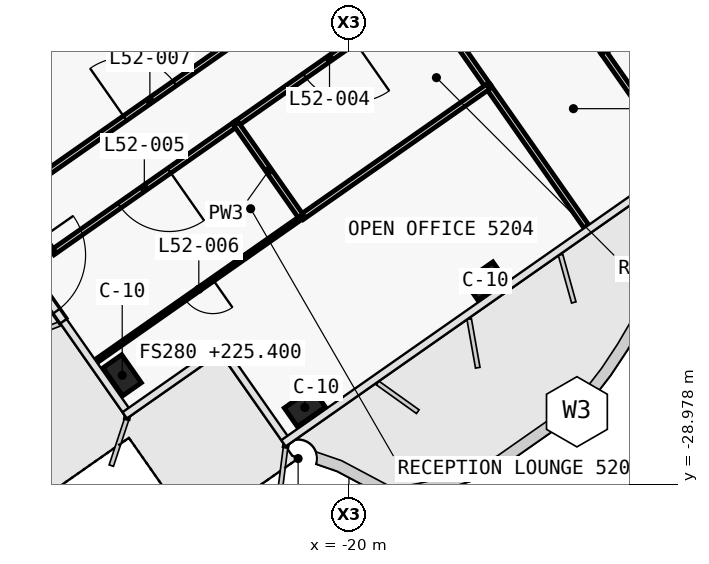
"""IFC4 building model, lengths in metres.
Left out: names, types, materials, properties, quantities, classifications, styles, units other than length and angle.
Written with IfcOpenShell. Run it as: python <this file> out.ifc"""

import sys

from ifc_helpers import new_model, si_unit, direction, frame, frame_2d, origin, origin_2d, place, context, subcontext, project, spatial, rectangle, extrude, element, fill, save


model = new_model("IFC4")
c1 = context("Model", 3, precision=1e-05, world=origin(), true_north=direction((0.0, 1.0)))
c2 = subcontext(c1, "Body", "Model", "MODEL_VIEW")
j1 = project(units=[si_unit("LENGTHUNIT", "METRE"), si_unit("PLANEANGLEUNIT", "RADIAN")], contexts=[c1])
p1 = place(None, origin())
s1 = spatial("IfcSite", under=j1, at=p1, CompositionType="ELEMENT")
p2 = place(p1, origin())
s2 = spatial("IfcBuilding", under=s1, at=p2, CompositionType="ELEMENT")
p3 = place(p2, frame((0.0, 0.0, 225.4)))
s3 = spatial("IfcBuildingStorey", under=s2, at=p3, CompositionType="ELEMENT", Elevation=225.4)
for number, where, z_axis, x_axis in (
    (1, (-16.41, -23.637, 0.0), (0.0, 0.0, 1.0), (-0.819, -0.574, 0.0)),
    (2, (-21.161, -26.964, 0.0), (0.0, 0.0, 1.0), (-0.819, -0.574, 0.0)),
    (3, (-25.966, -26.117, 0.0), (0.0, 0.0, 1.0), (-0.574, 0.819, 0.0)),
):
    element("IfcColumn", number, at=place(p3, frame(where, z_axis=z_axis, x_axis=x_axis)), inside=s3, PredefinedType="COLUMN", context=c2, shape_type="SweptSolid", body=[
        extrude(rectangle(XDim=0.9, YDim=0.6, at=origin_2d()), origin(), (0.0, 0.0, 1.0), 3.9),
    ])
p4 = place(p3, frame((-29.243, -22.222, 0.0), z_axis=(0.0, 0.0, 1.0), x_axis=(0.57360481557, -0.819132172213, 0.0)))
e4 = element("IfcWall", 4, at=p4, inside=s3, PredefinedType="SOLIDWALL", context=c2, shape_type="SweptSolid", body=[
    extrude(rectangle(XDim=2.99, YDim=0.2, at=frame_2d((1.495, 0.0))), origin(), (0.0, 0.0, 1.0), 3.62),
])
p5 = place(p4, frame((0.895, 0.0, 0.0)))
e5 = element("IfcOpeningElement", 5, at=p5, cuts=e4, PredefinedType="OPENING", context=c2, shape_type="SweptSolid", body=[
    extrude(rectangle(XDim=1.8, YDim=2.4, at=frame_2d((0.9, 1.2))), frame((0.0, 0.11, 0.0), z_axis=(0.0, -1.0, 0.0), x_axis=(1.0, 0.0, 0.0)), (0.0, 0.0, 1.0), 0.22),
])
p6 = place(p3, frame((-28.834, -21.411, 0.0), z_axis=(0.0, 0.0, 1.0), x_axis=(0.819144386599, 0.57358737251, 0.0)))
e6 = element("IfcWall", 6, at=p6, inside=s3, PredefinedType="PARTITIONING", context=c2, shape_type="SweptSolid", body=[
    extrude(rectangle(XDim=8.78, YDim=0.15, at=frame_2d((4.39, 0.0))), origin(), (0.0, 0.0, 1.0), 3.05),
])
p7 = place(p6, frame((3.59, 0.0, 0.0)))
e7 = element("IfcOpeningElement", 7, at=p7, cuts=e6, PredefinedType="OPENING", context=c2, shape_type="SweptSolid", body=[
    extrude(rectangle(XDim=1.6, YDim=2.1, at=frame_2d((0.8, 1.05))), frame((0.0, 0.085, 0.0), z_axis=(0.0, -1.0, 0.0), x_axis=(1.0, 0.0, 0.0)), (0.0, 0.0, 1.0), 0.17),
])
p8 = place(p3, frame((-18.052, -16.058, 0.0), z_axis=(0.0, 0.0, 1.0), x_axis=(-0.819145946981, -0.573585144111, 0.0)))
e8 = element("IfcWall", 8, at=p8, inside=s3, PredefinedType="PARTITIONING", context=c2, shape_type="SweptSolid", body=[
    extrude(rectangle(XDim=6.004, YDim=0.15, at=frame_2d((3.002, 0.0))), origin(), (0.0, 0.0, 1.0), 3.05),
])
p9 = place(p8, frame((2.202, 0.0, 0.0)))
e9 = element("IfcOpeningElement", 9, at=p9, cuts=e8, PredefinedType="OPENING", context=c2, shape_type="SweptSolid", body=[
    extrude(rectangle(XDim=1.6, YDim=2.1, at=frame_2d((0.8, 1.05))), frame((0.0, 0.085, 0.0), z_axis=(0.0, -1.0, 0.0), x_axis=(1.0, 0.0, 0.0)), (0.0, 0.0, 1.0), 0.17),
])
p10 = place(p3, frame((-22.967, -19.5, 0.0), z_axis=(0.0, 0.0, 1.0), x_axis=(-0.819156123335, -0.573570610825, 0.0)))
e10 = element("IfcWall", 10, at=p10, inside=s3, PredefinedType="PARTITIONING", context=c2, shape_type="SweptSolid", body=[
    extrude(rectangle(XDim=5.902, YDim=0.15, at=frame_2d((2.951, 0.0))), origin(), (0.0, 0.0, 1.0), 3.05),
])
p11 = place(p10, frame((2.151, 0.0, 0.0)))
e11 = element("IfcOpeningElement", 11, at=p11, cuts=e10, PredefinedType="OPENING", context=c2, shape_type="SweptSolid", body=[
    extrude(rectangle(XDim=1.6, YDim=2.1, at=frame_2d((0.8, 1.05))), frame((0.0, 0.085, 0.0), z_axis=(0.0, -1.0, 0.0), x_axis=(1.0, 0.0, 0.0)), (0.0, 0.0, 1.0), 0.17),
])
p12 = place(p3, frame((-27.802, -22.885, 0.0), z_axis=(0.0, 0.0, 1.0), x_axis=(-0.573629982879, 0.819114547998, 0.0)))
e12 = element("IfcWall", 12, at=p12, inside=s3, PredefinedType="PARTITIONING", context=c2, shape_type="SweptSolid", body=[
    extrude(rectangle(XDim=1.075, YDim=0.15, at=frame_2d((0.538, 0.0))), origin(), (0.0, 0.0, 1.0), 3.62),
])
p13 = place(p3, frame((-31.129, -19.354, 0.0), z_axis=(0.0, 0.0, 1.0), x_axis=(0.819154480923, 0.573572956461, 0.0)))
e13 = element("IfcWall", 13, at=p13, inside=s3, PredefinedType="PARTITIONING", context=c2, shape_type="SweptSolid", body=[
    extrude(rectangle(XDim=9.48, YDim=0.1, at=frame_2d((4.74, 0.0))), origin(), (0.0, 0.0, 1.0), 3.0),
])
p14 = place(p13, frame((4.29, 0.0, 0.0)))
e14 = element("IfcOpeningElement", 14, at=p14, cuts=e13, PredefinedType="OPENING", context=c2, shape_type="SweptSolid", body=[
    extrude(rectangle(XDim=0.9, YDim=2.1, at=frame_2d((0.45, 1.05))), frame((0.0, 0.06, 0.0), z_axis=(0.0, -1.0, 0.0), x_axis=(1.0, 0.0, 0.0)), (0.0, 0.0, 1.0), 0.12),
])
p15 = place(p3, frame((-3.471, -10.733, 0.0), z_axis=(0.0, 0.0, 1.0), x_axis=(-0.819146845232, -0.573583861302, 0.0)))
e15 = element("IfcWall", 15, at=p15, inside=s3, PredefinedType="PARTITIONING", context=c2, shape_type="SweptSolid", body=[
    extrude(rectangle(XDim=12.0, YDim=0.1, at=frame_2d((6.0, 0.0))), origin(), (0.0, 0.0, 1.0), 3.05),
])
p16 = place(p15, frame((5.55, 0.0, 0.0)))
e16 = element("IfcOpeningElement", 16, at=p16, cuts=e15, PredefinedType="OPENING", context=c2, shape_type="SweptSolid", body=[
    extrude(rectangle(XDim=0.9, YDim=2.1, at=frame_2d((0.45, 1.05))), frame((0.0, 0.06, 0.0), z_axis=(0.0, -1.0, 0.0), x_axis=(1.0, 0.0, 0.0)), (0.0, 0.0, 1.0), 0.12),
])
p17 = place(p3, frame((-11.294, -20.482, 0.0), z_axis=(0.0, 0.0, 1.0), x_axis=(-0.573555999232, 0.819166354134, 0.0)))
e17 = element("IfcWall", 17, at=p17, inside=s3, PredefinedType="PARTITIONING", context=c2, shape_type="SweptSolid", body=[
    extrude(rectangle(XDim=3.499, YDim=0.15, at=frame_2d((1.75, 0.0))), origin(), (0.0, 0.0, 1.0), 3.0),
])
p18 = place(p3, frame((-13.302, -17.615, 0.0), z_axis=(0.0, 0.0, 1.0), x_axis=(-0.573556557423, 0.819165963305, 0.0)))
e18 = element("IfcWall", 18, at=p18, inside=s3, PredefinedType="PARTITIONING", context=c2, shape_type="SweptSolid", body=[
    extrude(rectangle(XDim=4.0, YDim=0.15, at=frame_2d((2.0, 0.0))), origin(), (0.0, 0.0, 1.0), 3.62),
])
p19 = place(p3, frame((-16.332, -18.519, 0.0), z_axis=(0.0, 0.0, 1.0), x_axis=(-0.573604249862, 0.819132568355, 0.0)))
e19 = element("IfcWall", 19, at=p19, inside=s3, PredefinedType="PARTITIONING", context=c2, shape_type="SweptSolid", body=[
    extrude(rectangle(XDim=3.002, YDim=0.15, at=frame_2d((1.501, 0.0))), origin(), (0.0, 0.0, 1.0), 3.62),
])
p20 = place(p3, frame((-13.752, -22.203, 0.0), z_axis=(0.0, 0.0, 1.0), x_axis=(-0.573593387921, 0.81914017441, 0.0)))
e20 = element("IfcWall", 20, at=p20, inside=s3, PredefinedType="PARTITIONING", context=c2, shape_type="SweptSolid", body=[
    extrude(rectangle(XDim=4.501, YDim=0.15, at=frame_2d((2.25, 0.0))), origin(), (0.0, 0.0, 1.0), 3.0),
])
p21 = place(p3, frame((-16.333, -18.517, 0.0), z_axis=(0.0, 0.0, 1.0), x_axis=(-0.819130592339, -0.573607071691, 0.0)))
e21 = element("IfcWall", 21, at=p21, inside=s3, PredefinedType="PARTITIONING", context=c2, shape_type="SweptSolid", body=[
    extrude(rectangle(XDim=6.0, YDim=0.15, at=frame_2d((3.0, 0.0))), origin(), (0.0, 0.0, 1.0), 3.05),
])
p22 = place(p3, frame((-21.248, -21.958, 0.0), z_axis=(0.0, 0.0, 1.0), x_axis=(-0.573560650686, 0.819163097304, 0.0)))
e22 = element("IfcWall", 22, at=p22, inside=s3, PredefinedType="PARTITIONING", context=c2, shape_type="SweptSolid", body=[
    extrude(rectangle(XDim=3.0, YDim=0.15, at=frame_2d((1.5, 0.0))), origin(), (0.0, 0.0, 1.0), 3.62),
])
p23 = place(p3, frame((-21.247, -21.959, 0.0), z_axis=(0.0, 0.0, 1.0), x_axis=(-0.819141541656, -0.573591435374, 0.0)))
e23 = element("IfcWall", 23, at=p23, inside=s3, PredefinedType="PARTITIONING", context=c2, shape_type="SweptSolid", body=[
    extrude(rectangle(XDim=6.6, YDim=0.1, at=frame_2d((3.3, 0.0))), origin(), (0.0, 0.0, 1.0), 3.0),
])
p24 = place(p23, frame((2.85, 0.0, 0.0)))
e24 = element("IfcOpeningElement", 24, at=p24, cuts=e23, PredefinedType="OPENING", context=c2, shape_type="SweptSolid", body=[
    extrude(rectangle(XDim=0.9, YDim=2.1, at=frame_2d((0.45, 1.05))), frame((0.0, 0.06, 0.0), z_axis=(0.0, -1.0, 0.0), x_axis=(1.0, 0.0, 0.0)), (0.0, 0.0, 1.0), 0.12),
])
p25 = place(p5, origin())
e25 = element("IfcDoor", 25, at=p25, inside=s3, OperationType="DOUBLE_DOOR_DOUBLE_SWING", PredefinedType="DOOR", context=c2, shape_type="SweptSolid", body=[
    extrude(rectangle(XDim=1.8, YDim=2.4, at=frame_2d((0.9, 1.2))), frame((0.0, 0.025, 0.0), z_axis=(0.0, -1.0, 0.0), x_axis=(1.0, 0.0, 0.0)), (0.0, 0.0, 1.0), 0.05),
])
fill(e5, e25)
p26 = place(p9, origin())
e26 = element("IfcDoor", 26, at=p26, inside=s3, OperationType="DOUBLE_DOOR_SINGLE_SWING", PredefinedType="DOOR", context=c2, shape_type="SweptSolid", body=[
    extrude(rectangle(XDim=1.6, YDim=2.1, at=frame_2d((0.8, 1.05))), frame((0.0, 0.025, 0.0), z_axis=(0.0, -1.0, 0.0), x_axis=(1.0, 0.0, 0.0)), (0.0, 0.0, 1.0), 0.05),
])
fill(e9, e26)
p27 = place(p11, origin())
e27 = element("IfcDoor", 27, at=p27, inside=s3, OperationType="DOUBLE_DOOR_SINGLE_SWING", PredefinedType="DOOR", context=c2, shape_type="SweptSolid", body=[
    extrude(rectangle(XDim=1.6, YDim=2.1, at=frame_2d((0.8, 1.05))), frame((0.0, 0.025, 0.0), z_axis=(0.0, -1.0, 0.0), x_axis=(1.0, 0.0, 0.0)), (0.0, 0.0, 1.0), 0.05),
])
fill(e11, e27)
p28 = place(p24, origin())
e28 = element("IfcDoor", 28, at=p28, inside=s3, OperationType="SINGLE_SWING_LEFT", PredefinedType="DOOR", context=c2, shape_type="SweptSolid", body=[
    extrude(rectangle(XDim=0.9, YDim=2.1, at=frame_2d((0.45, 1.05))), frame((0.0, 0.025, 0.0), z_axis=(0.0, -1.0, 0.0), x_axis=(1.0, 0.0, 0.0)), (0.0, 0.0, 1.0), 0.05),
])
fill(e24, e28)
p29 = place(p7, origin())
e29 = element("IfcDoor", 29, at=p29, inside=s3, OperationType="DOUBLE_DOOR_SINGLE_SWING", PredefinedType="DOOR", context=c2, shape_type="SweptSolid", body=[
    extrude(rectangle(XDim=1.6, YDim=2.1, at=frame_2d((0.8, 1.05))), frame((0.0, 0.025, 0.0), z_axis=(0.0, -1.0, 0.0), x_axis=(1.0, 0.0, 0.0)), (0.0, 0.0, 1.0), 0.05),
])
fill(e7, e29)
save(model, sys.argv[1])
